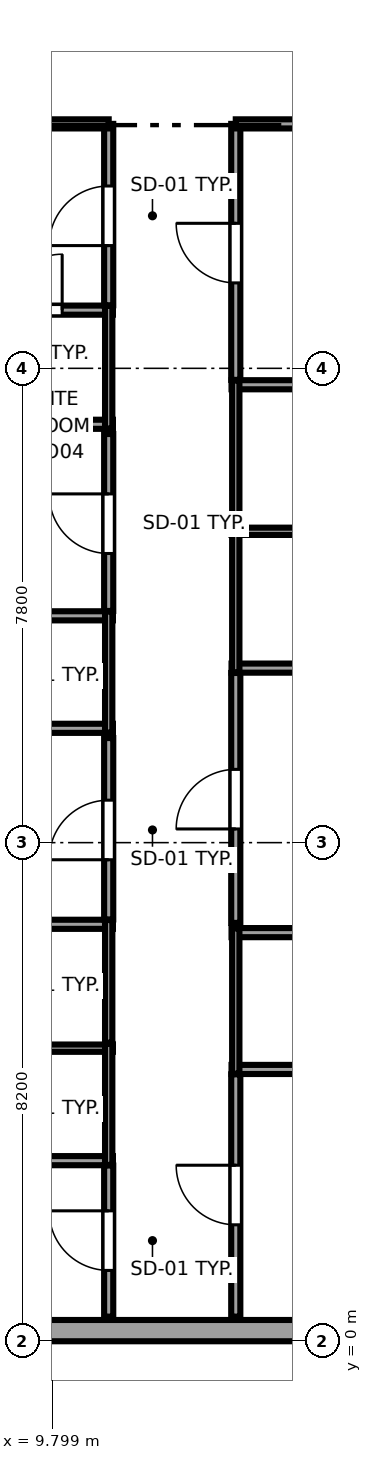
"""IFC4 building model, lengths in metres.
Left out: names, types, materials, properties, quantities, classifications, styles, units other than length and angle.
Written with IfcOpenShell. Run it as: python <this file> out.ifc"""

import sys

from ifc_helpers import new_model, si_unit, direction, frame, frame_2d, origin, place, context, subcontext, project, spatial, rectangle, extrude, source, transform, mapped, element, fill, save


model = new_model("IFC4")
c1 = context("Model", 3, precision=1e-05, world=origin(), true_north=direction((0.0, 1.0)))
c2 = subcontext(c1, "Body", "Model", "MODEL_VIEW")
j1 = project(units=[si_unit("LENGTHUNIT", "METRE"), si_unit("PLANEANGLEUNIT", "RADIAN")], contexts=[c1])
p1 = place(None, origin())
s1 = spatial("IfcSite", under=j1, at=p1, CompositionType="ELEMENT")
p2 = place(p1, origin())
s2 = spatial("IfcBuilding", under=s1, at=p2, CompositionType="ELEMENT")
p3 = place(p2, frame((0.0, 0.0, 136.4)))
s3 = spatial("IfcBuildingStorey", under=s2, at=p3, CompositionType="ELEMENT", Elevation=136.4)
p4 = place(p3, frame((4.617, 0.175, 0.0), z_axis=(0.0, 0.0, 1.0), x_axis=(1.0, 0.0, 0.0)))
e1 = element("IfcWall", 1, at=p4, inside=s3, PredefinedType="SOLIDWALL", context=c2, shape_type="SweptSolid", body=[
    extrude(rectangle(XDim=18.008, YDim=0.35, at=frame_2d((9.004, 0.0))), origin(), (0.0, 0.0, 1.0), 3.37),
])
p5 = place(p4, frame((11.255, 0.0, 0.68)))
e2 = element("IfcOpeningElement", 2, at=p5, cuts=e1, PredefinedType="OPENING", context=c2, shape_type="SweptSolid", body=[
    extrude(rectangle(XDim=1.8, YDim=1.85, at=frame_2d((0.9, 0.925))), frame((0.0, 0.185, 0.0), z_axis=(0.0, -1.0, 0.0), x_axis=(1.0, 0.0, 0.0)), (0.0, 0.0, 1.0), 0.37),
])
p6 = place(p4, frame((14.407, 0.0, 0.68)))
e3 = element("IfcOpeningElement", 3, at=p6, cuts=e1, PredefinedType="OPENING", context=c2, shape_type="SweptSolid", body=[
    extrude(rectangle(XDim=1.8, YDim=1.85, at=frame_2d((0.9, 0.925))), frame((0.0, 0.185, 0.0), z_axis=(0.0, -1.0, 0.0), x_axis=(1.0, 0.0, 0.0)), (0.0, 0.0, 1.0), 0.37),
])
p7 = place(p4, frame((2.391, 0.0, 0.62)))
e4 = element("IfcOpeningElement", 4, at=p7, cuts=e1, PredefinedType="OPENING", context=c2, shape_type="SweptSolid", body=[
    extrude(rectangle(XDim=1.5, YDim=1.55, at=frame_2d((0.75, 0.775))), frame((0.0, 0.185, 0.0), z_axis=(0.0, -1.0, 0.0), x_axis=(1.0, 0.0, 0.0)), (0.0, 0.0, 1.0), 0.37),
])
p8 = place(p3, frame((8.21, 2.97, 0.0), z_axis=(0.0, 0.0, 1.0), x_axis=(1.0, 0.0, 0.0)))
e5 = element("IfcWall", 5, at=p8, inside=s3, PredefinedType="PARTITIONING", context=c2, shape_type="SweptSolid", body=[
    extrude(rectangle(XDim=2.59, YDim=0.15, at=frame_2d((1.295, 0.0))), origin(), (0.0, 0.0, 1.0), 3.37),
])
p9 = place(p3, frame((8.21, 4.82, 0.0), z_axis=(0.0, 0.0, 1.0), x_axis=(1.0, 0.0, 0.0)))
e6 = element("IfcWall", 6, at=p9, inside=s3, PredefinedType="PLUMBINGWALL", context=c2, shape_type="SweptSolid", body=[
    extrude(rectangle(XDim=2.59, YDim=0.12, at=frame_2d((1.295, 0.0))), origin(), (0.0, 0.0, 1.0), 3.37),
])
p10 = place(p3, frame((10.73, 2.9, 0.0), z_axis=(0.0, 0.0, 1.0), x_axis=(0.0, 1.0, 0.0)))
e7 = element("IfcWall", 7, at=p10, inside=s3, PredefinedType="PLUMBINGWALL", context=c2, shape_type="SweptSolid", body=[
    extrude(rectangle(XDim=1.99, YDim=0.12, at=frame_2d((0.995, 0.0))), origin(), (0.0, 0.0, 1.0), 3.37),
])
p11 = place(p3, frame((8.21, 6.857, 0.0), z_axis=(0.0, 0.0, 1.0), x_axis=(1.0, 0.0, 0.0)))
e8 = element("IfcWall", 8, at=p11, inside=s3, PredefinedType="PARTITIONING", context=c2, shape_type="SweptSolid", body=[
    extrude(rectangle(XDim=2.59, YDim=0.15, at=frame_2d((1.295, 0.0))), origin(), (0.0, 0.0, 1.0), 3.37),
])
p12 = place(p3, frame((10.73, 4.91, 0.0), z_axis=(0.0, 0.0, 1.0), x_axis=(0.0, 1.0, 0.0)))
e9 = element("IfcWall", 9, at=p12, inside=s3, PredefinedType="PLUMBINGWALL", context=c2, shape_type="SweptSolid", body=[
    extrude(rectangle(XDim=2.017, YDim=0.12, at=frame_2d((1.009, 0.0))), origin(), (0.0, 0.0, 1.0), 3.37),
])
p13 = place(p3, frame((0.405, 10.08, 0.0), z_axis=(0.0, 0.0, 1.0), x_axis=(1.0, 0.0, 0.0)))
e10 = element("IfcWall", 10, at=p13, inside=s3, PredefinedType="PARTITIONING", context=c2, shape_type="SweptSolid", body=[
    extrude(rectangle(XDim=10.395, YDim=0.15, at=frame_2d((5.198, 0.0))), origin(), (0.0, 0.0, 1.0), 3.37),
])
p14 = place(p3, frame((8.21, 11.93, 0.0), z_axis=(0.0, 0.0, 1.0), x_axis=(1.0, 0.0, 0.0)))
e11 = element("IfcWall", 11, at=p14, inside=s3, PredefinedType="PARTITIONING", context=c2, shape_type="SweptSolid", body=[
    extrude(rectangle(XDim=2.59, YDim=0.15, at=frame_2d((1.295, 0.0))), origin(), (0.0, 0.0, 1.0), 3.37),
])
p15 = place(p3, frame((10.73, 10.01, 0.0), z_axis=(0.0, 0.0, 1.0), x_axis=(0.0, 1.0, 0.0)))
e12 = element("IfcWall", 12, at=p15, inside=s3, PredefinedType="PLUMBINGWALL", context=c2, shape_type="SweptSolid", body=[
    extrude(rectangle(XDim=1.99, YDim=0.12, at=frame_2d((0.995, 0.0))), origin(), (0.0, 0.0, 1.0), 3.37),
])
p16 = place(p3, frame((0.405, 15.08, 0.0), z_axis=(0.0, 0.0, 1.0), x_axis=(1.0, 0.0, 0.0)))
e13 = element("IfcWall", 13, at=p16, inside=s3, PredefinedType="PARTITIONING", context=c2, shape_type="SweptSolid", body=[
    extrude(rectangle(XDim=10.395, YDim=0.15, at=frame_2d((5.198, 0.0))), origin(), (0.0, 0.0, 1.0), 3.37),
])
p17 = place(p3, frame((8.21, 16.957, 0.0), z_axis=(0.0, 0.0, 1.0), x_axis=(1.0, 0.0, 0.0)))
e14 = element("IfcWall", 14, at=p17, inside=s3, PredefinedType="PARTITIONING", context=c2, shape_type="SweptSolid", body=[
    extrude(rectangle(XDim=2.59, YDim=0.15, at=frame_2d((1.295, 0.0))), origin(), (0.0, 0.0, 1.0), 3.37),
])
p18 = place(p17, frame((0.835, 0.0, 0.0)))
e15 = element("IfcOpeningElement", 15, at=p18, cuts=e14, PredefinedType="OPENING", context=c2, shape_type="SweptSolid", body=[
    extrude(rectangle(XDim=0.92, YDim=2.01, at=frame_2d((0.46, 1.005))), frame((0.0, 0.085, 0.0), z_axis=(0.0, -1.0, 0.0), x_axis=(1.0, 0.0, 0.0)), (0.0, 0.0, 1.0), 0.17),
])
p19 = place(p3, frame((10.73, 15.01, 0.0), z_axis=(0.0, 0.0, 1.0), x_axis=(0.0, 1.0, 0.0)))
e16 = element("IfcWall", 16, at=p19, inside=s3, PredefinedType="PLUMBINGWALL", context=c2, shape_type="SweptSolid", body=[
    extrude(rectangle(XDim=2.017, YDim=0.12, at=frame_2d((1.009, 0.0))), origin(), (0.0, 0.0, 1.0), 3.37),
])
for number, where, z_axis, x_axis in (
    (17, (12.75, 4.47, 0.0), (0.0, 0.0, 1.0), (1.0, 0.0, 0.0)),
    (18, (12.75, 6.72, 0.0), (0.0, 0.0, 1.0), (1.0, 0.0, 0.0)),
):
    element("IfcWall", number, at=place(p3, frame(where, z_axis=z_axis, x_axis=x_axis)), inside=s3, PredefinedType="PARTITIONING", context=c2, shape_type="SweptSolid", body=[
        extrude(rectangle(XDim=2.59, YDim=0.15, at=frame_2d((1.295, 0.0))), origin(), (0.0, 0.0, 1.0), 3.37),
    ])
p20 = place(p3, frame((12.82, 4.4, 0.0), z_axis=(0.0, 0.0, 1.0), x_axis=(0.0, 1.0, 0.0)))
e19 = element("IfcWall", 19, at=p20, inside=s3, PredefinedType="PLUMBINGWALL", context=c2, shape_type="SweptSolid", body=[
    extrude(rectangle(XDim=2.39, YDim=0.12, at=frame_2d((1.195, 0.0))), origin(), (0.0, 0.0, 1.0), 3.37),
])
p21 = place(p3, frame((12.75, 11.07, 0.0), z_axis=(0.0, 0.0, 1.0), x_axis=(1.0, 0.0, 0.0)))
e20 = element("IfcWall", 20, at=p21, inside=s3, PredefinedType="PARTITIONING", context=c2, shape_type="SweptSolid", body=[
    extrude(rectangle(XDim=2.59, YDim=0.15, at=frame_2d((1.295, 0.0))), origin(), (0.0, 0.0, 1.0), 3.37),
])
p22 = place(p3, frame((12.75, 13.32, 0.0), z_axis=(0.0, 0.0, 1.0), x_axis=(1.0, 0.0, 0.0)))
e21 = element("IfcWall", 21, at=p22, inside=s3, PredefinedType="PLUMBINGWALL", context=c2, shape_type="SweptSolid", body=[
    extrude(rectangle(XDim=2.59, YDim=0.12, at=frame_2d((1.295, 0.0))), origin(), (0.0, 0.0, 1.0), 3.37),
])
p23 = place(p3, frame((12.82, 11.0, 0.0), z_axis=(0.0, 0.0, 1.0), x_axis=(0.0, 1.0, 0.0)))
e22 = element("IfcWall", 22, at=p23, inside=s3, PredefinedType="PLUMBINGWALL", context=c2, shape_type="SweptSolid", body=[
    extrude(rectangle(XDim=2.39, YDim=0.12, at=frame_2d((1.195, 0.0))), origin(), (0.0, 0.0, 1.0), 3.37),
])
p24 = place(p3, frame((12.75, 15.73, 0.0), z_axis=(0.0, 0.0, 1.0), x_axis=(1.0, 0.0, 0.0)))
e23 = element("IfcWall", 23, at=p24, inside=s3, PredefinedType="PARTITIONING", context=c2, shape_type="SweptSolid", body=[
    extrude(rectangle(XDim=2.59, YDim=0.15, at=frame_2d((1.295, 0.0))), origin(), (0.0, 0.0, 1.0), 3.37),
])
p25 = place(p3, frame((12.82, 13.41, 0.0), z_axis=(0.0, 0.0, 1.0), x_axis=(0.0, 1.0, 0.0)))
e24 = element("IfcWall", 24, at=p25, inside=s3, PredefinedType="PLUMBINGWALL", context=c2, shape_type="SweptSolid", body=[
    extrude(rectangle(XDim=2.39, YDim=0.12, at=frame_2d((1.195, 0.0))), origin(), (0.0, 0.0, 1.0), 3.37),
])
p26 = place(p3, frame((10.73, 0.405, 0.0), z_axis=(0.0, 0.0, 1.0), x_axis=(0.0, 1.0, 0.0)))
e25 = element("IfcWall", 25, at=p26, inside=s3, PredefinedType="PARTITIONING", context=c2, shape_type="SweptSolid", body=[
    extrude(rectangle(XDim=2.485, YDim=0.15, at=frame_2d((1.242, 0.0))), origin(), (0.0, 0.0, 1.0), 3.37),
])
p27 = place(p26, frame((0.76, 0.0, 0.0)))
e26 = element("IfcOpeningElement", 26, at=p27, cuts=e25, PredefinedType="OPENING", context=c2, shape_type="SweptSolid", body=[
    extrude(rectangle(XDim=0.98, YDim=2.12, at=frame_2d((0.49, 1.06))), frame((0.0, 0.085, 0.0), z_axis=(0.0, -1.0, 0.0), x_axis=(1.0, 0.0, 0.0)), (0.0, 0.0, 1.0), 0.17),
])
p28 = place(p3, frame((10.73, 6.937, 0.0), z_axis=(0.0, 0.0, 1.0), x_axis=(0.0, 1.0, 0.0)))
e27 = element("IfcWall", 27, at=p28, inside=s3, PredefinedType="PARTITIONING", context=c2, shape_type="SweptSolid", body=[
    extrude(rectangle(XDim=2.983, YDim=0.15, at=frame_2d((1.491, 0.0))), origin(), (0.0, 0.0, 1.0), 3.37),
])
p29 = place(p28, frame((0.981, 0.0, 0.0)))
e28 = element("IfcOpeningElement", 28, at=p29, cuts=e27, PredefinedType="OPENING", context=c2, shape_type="SweptSolid", body=[
    extrude(rectangle(XDim=0.98, YDim=2.12, at=frame_2d((0.49, 1.06))), frame((0.0, 0.085, 0.0), z_axis=(0.0, -1.0, 0.0), x_axis=(1.0, 0.0, 0.0)), (0.0, 0.0, 1.0), 0.17),
])
p30 = place(p3, frame((10.73, 12.01, 0.0), z_axis=(0.0, 0.0, 1.0), x_axis=(0.0, 1.0, 0.0)))
e29 = element("IfcWall", 29, at=p30, inside=s3, PredefinedType="PARTITIONING", context=c2, shape_type="SweptSolid", body=[
    extrude(rectangle(XDim=2.91, YDim=0.15, at=frame_2d((1.455, 0.0))), origin(), (0.0, 0.0, 1.0), 3.37),
])
p31 = place(p30, frame((0.945, 0.0, 0.0)))
e30 = element("IfcOpeningElement", 30, at=p31, cuts=e29, PredefinedType="OPENING", context=c2, shape_type="SweptSolid", body=[
    extrude(rectangle(XDim=0.98, YDim=2.12, at=frame_2d((0.49, 1.06))), frame((0.0, 0.085, 0.0), z_axis=(0.0, -1.0, 0.0), x_axis=(1.0, 0.0, 0.0)), (0.0, 0.0, 1.0), 0.17),
])
p32 = place(p3, frame((10.73, 17.037, 0.0), z_axis=(0.0, 0.0, 1.0), x_axis=(0.0, 1.0, 0.0)))
e31 = element("IfcWall", 31, at=p32, inside=s3, PredefinedType="PARTITIONING", context=c2, shape_type="SweptSolid", body=[
    extrude(rectangle(XDim=2.983, YDim=0.15, at=frame_2d((1.491, 0.0))), origin(), (0.0, 0.0, 1.0), 3.37),
])
p33 = place(p32, frame((0.981, 0.0, 0.0)))
e32 = element("IfcOpeningElement", 32, at=p33, cuts=e31, PredefinedType="OPENING", context=c2, shape_type="SweptSolid", body=[
    extrude(rectangle(XDim=0.98, YDim=2.12, at=frame_2d((0.49, 1.06))), frame((0.0, 0.085, 0.0), z_axis=(0.0, -1.0, 0.0), x_axis=(1.0, 0.0, 0.0)), (0.0, 0.0, 1.0), 0.17),
])
p34 = place(p3, frame((0.405, 20.02, 0.0), z_axis=(0.0, 0.0, 1.0), x_axis=(1.0, 0.0, 0.0)))
e33 = element("IfcWall", 33, at=p34, inside=s3, PredefinedType="PARTITIONING", context=c2, shape_type="SweptSolid", body=[
    extrude(rectangle(XDim=10.325, YDim=0.15, at=frame_2d((5.163, 0.0))), origin(), (0.0, 0.0, 1.0), 3.37),
])
p35 = place(p3, frame((12.82, 0.405, 0.0), z_axis=(0.0, 0.0, 1.0), x_axis=(0.0, 1.0, 0.0)))
e34 = element("IfcWall", 34, at=p35, inside=s3, PredefinedType="PARTITIONING", context=c2, shape_type="SweptSolid", body=[
    extrude(rectangle(XDim=3.985, YDim=0.15, at=frame_2d((1.992, 0.0))), origin(), (0.0, 0.0, 1.0), 3.37),
])
p36 = place(p35, frame((1.51, 0.0, 0.0)))
e35 = element("IfcOpeningElement", 35, at=p36, cuts=e34, PredefinedType="OPENING", context=c2, shape_type="SweptSolid", body=[
    extrude(rectangle(XDim=0.98, YDim=2.12, at=frame_2d((0.49, 1.06))), frame((0.0, 0.085, 0.0), z_axis=(0.0, -1.0, 0.0), x_axis=(1.0, 0.0, 0.0)), (0.0, 0.0, 1.0), 0.17),
])
p37 = place(p3, frame((12.82, 6.88, 0.0), z_axis=(0.0, 0.0, 1.0), x_axis=(0.0, 1.0, 0.0)))
e36 = element("IfcWall", 36, at=p37, inside=s3, PredefinedType="PARTITIONING", context=c2, shape_type="SweptSolid", body=[
    extrude(rectangle(XDim=4.11, YDim=0.15, at=frame_2d((2.055, 0.0))), origin(), (0.0, 0.0, 1.0), 3.37),
])
p38 = place(p37, frame((1.545, 0.0, 0.0)))
e37 = element("IfcOpeningElement", 37, at=p38, cuts=e36, PredefinedType="OPENING", context=c2, shape_type="SweptSolid", body=[
    extrude(rectangle(XDim=0.98, YDim=2.12, at=frame_2d((0.49, 1.06))), frame((0.0, 0.085, 0.0), z_axis=(0.0, -1.0, 0.0), x_axis=(1.0, 0.0, 0.0)), (0.0, 0.0, 1.0), 0.17),
])
p39 = place(p3, frame((12.82, 15.81, 0.0), z_axis=(0.0, 0.0, 1.0), x_axis=(0.0, 1.0, 0.0)))
e38 = element("IfcWall", 38, at=p39, inside=s3, PredefinedType="PARTITIONING", context=c2, shape_type="SweptSolid", body=[
    extrude(rectangle(XDim=4.21, YDim=0.15, at=frame_2d((2.105, 0.0))), origin(), (0.0, 0.0, 1.0), 3.37),
])
p40 = place(p39, frame((1.595, 0.0, 0.0)))
e39 = element("IfcOpeningElement", 39, at=p40, cuts=e38, PredefinedType="OPENING", context=c2, shape_type="SweptSolid", body=[
    extrude(rectangle(XDim=0.98, YDim=2.12, at=frame_2d((0.49, 1.06))), frame((0.0, 0.085, 0.0), z_axis=(0.0, -1.0, 0.0), x_axis=(1.0, 0.0, 0.0)), (0.0, 0.0, 1.0), 0.17),
])
p41 = place(p3, frame((12.82, 20.02, 0.0), z_axis=(0.0, 0.0, 1.0), x_axis=(1.0, 0.0, 0.0)))
e40 = element("IfcWall", 40, at=p41, inside=s3, PredefinedType="PARTITIONING", context=c2, shape_type="SweptSolid", body=[
    extrude(rectangle(XDim=9.53, YDim=0.15, at=frame_2d((4.765, 0.0))), origin(), (0.0, 0.0, 1.0), 2.954),
])
m1 = source(origin(), c2, "Body", "SweptSolid", [
    extrude(rectangle(XDim=0.92, YDim=2.01, at=frame_2d((0.46, 1.005))), frame((0.0, 0.025, 0.0), z_axis=(0.0, -1.0, 0.0), x_axis=(1.0, 0.0, 0.0)), (0.0, 0.0, 1.0), 0.05),
])
p42 = place(p18, origin())
e41 = element("IfcDoor", 41, at=p42, inside=s3, OperationType="SINGLE_SWING_RIGHT", PredefinedType="DOOR", context=c2, shape_type="MappedRepresentation", body=[
    mapped(m1, transform((0.0, 0.0, 0.0), x_axis=(1.0, 0.0, 0.0), y_axis=(0.0, 1.0, 0.0), z_axis=(0.0, 0.0, 1.0), scale=1.0)),
])
fill(e15, e41)
m2 = source(origin(), c2, "Body", "SweptSolid", [
    extrude(rectangle(XDim=0.98, YDim=2.12, at=frame_2d((0.49, 1.06))), frame((0.0, 0.025, 0.0), z_axis=(0.0, -1.0, 0.0), x_axis=(1.0, 0.0, 0.0)), (0.0, 0.0, 1.0), 0.05),
])
p43 = place(p27, origin())
e42 = element("IfcDoor", 42, at=p43, inside=s3, OperationType="SINGLE_SWING_RIGHT", PredefinedType="DOOR", context=c2, shape_type="MappedRepresentation", body=[
    mapped(m2, transform((0.0, 0.0, 0.0), x_axis=(1.0, 0.0, 0.0), y_axis=(0.0, 1.0, 0.0), z_axis=(0.0, 0.0, 1.0), scale=1.0)),
])
fill(e26, e42)
p44 = place(p29, origin())
e43 = element("IfcDoor", 43, at=p44, inside=s3, OperationType="SINGLE_SWING_LEFT", PredefinedType="DOOR", context=c2, shape_type="MappedRepresentation", body=[
    mapped(m2, transform((0.0, 0.0, 0.0), x_axis=(1.0, 0.0, 0.0), y_axis=(0.0, 1.0, 0.0), z_axis=(0.0, 0.0, 1.0), scale=1.0)),
])
fill(e28, e43)
p45 = place(p31, origin())
e44 = element("IfcDoor", 44, at=p45, inside=s3, OperationType="SINGLE_SWING_RIGHT", PredefinedType="DOOR", context=c2, shape_type="MappedRepresentation", body=[
    mapped(m2, transform((0.0, 0.0, 0.0), x_axis=(1.0, 0.0, 0.0), y_axis=(0.0, 1.0, 0.0), z_axis=(0.0, 0.0, 1.0), scale=1.0)),
])
fill(e30, e44)
p46 = place(p33, origin())
e45 = element("IfcDoor", 45, at=p46, inside=s3, OperationType="SINGLE_SWING_LEFT", PredefinedType="DOOR", context=c2, shape_type="MappedRepresentation", body=[
    mapped(m2, transform((0.0, 0.0, 0.0), x_axis=(1.0, 0.0, 0.0), y_axis=(0.0, 1.0, 0.0), z_axis=(0.0, 0.0, 1.0), scale=1.0)),
])
fill(e32, e45)
p47 = place(p36, origin())
e46 = element("IfcDoor", 46, at=p47, inside=s3, OperationType="SINGLE_SWING_RIGHT", PredefinedType="DOOR", context=c2, shape_type="MappedRepresentation", body=[
    mapped(m2, transform((0.0, 0.0, 0.0), x_axis=(1.0, 0.0, 0.0), y_axis=(0.0, 1.0, 0.0), z_axis=(0.0, 0.0, 1.0), scale=1.0)),
])
fill(e35, e46)
p48 = place(p38, origin())
e47 = element("IfcDoor", 47, at=p48, inside=s3, OperationType="SINGLE_SWING_LEFT", PredefinedType="DOOR", context=c2, shape_type="MappedRepresentation", body=[
    mapped(m2, transform((0.0, 0.0, 0.0), x_axis=(1.0, 0.0, 0.0), y_axis=(0.0, 1.0, 0.0), z_axis=(0.0, 0.0, 1.0), scale=1.0)),
])
fill(e37, e47)
p49 = place(p40, origin())
e48 = element("IfcDoor", 48, at=p49, inside=s3, OperationType="SINGLE_SWING_RIGHT", PredefinedType="DOOR", context=c2, shape_type="MappedRepresentation", body=[
    mapped(m2, transform((0.0, 0.0, 0.0), x_axis=(1.0, 0.0, 0.0), y_axis=(0.0, 1.0, 0.0), z_axis=(0.0, 0.0, 1.0), scale=1.0)),
])
fill(e39, e48)
save(model, sys.argv[1])
